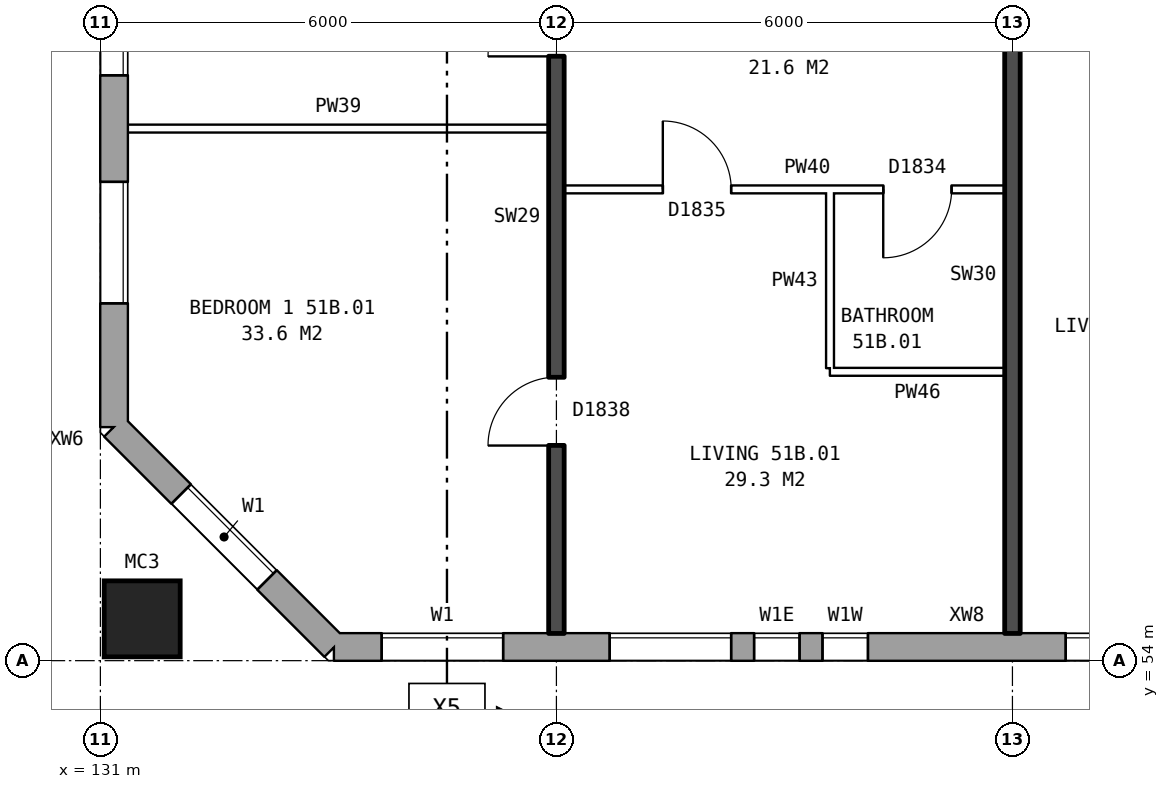
"""IFC4 building model, lengths in metres.
Left out: names, types, materials, properties, quantities, classifications, styles, units other than length and angle.
Written with IfcOpenShell. Run it as: python <this file> out.ifc"""

import sys

from ifc_helpers import new_model, si_unit, direction, frame, frame_2d, origin, origin_2d, place, context, subcontext, project, spatial, rectangle, hollow_rectangle, extrude, element, fill, save


model = new_model("IFC4")
c1 = context("Model", 3, precision=1e-05, world=origin(), true_north=direction((0.0, 1.0)))
c2 = subcontext(c1, "Body", "Model", "MODEL_VIEW")
j1 = project(units=[si_unit("LENGTHUNIT", "METRE"), si_unit("PLANEANGLEUNIT", "RADIAN")], contexts=[c1])
p1 = place(None, origin())
s1 = spatial("IfcSite", under=j1, at=p1, CompositionType="ELEMENT")
p2 = place(p1, origin())
s2 = spatial("IfcBuilding", under=s1, at=p2, CompositionType="ELEMENT")
p3 = place(p2, frame((0.0, 0.0, 182.0)))
s3 = spatial("IfcBuildingStorey", under=s2, at=p3, CompositionType="ELEMENT", Elevation=182.0)
p4 = place(p3, frame((131.55, 54.55, 0.0), z_axis=(0.0, 0.0, 1.0), x_axis=(1.0, 0.0, 0.0)))
e1 = element("IfcColumn", 1, at=p4, inside=s3, PredefinedType="COLUMN", context=c2, shape_type="SweptSolid", body=[
    extrude(hollow_rectangle(XDim=1.0, YDim=1.0, WallThickness=0.055, at=origin_2d()), origin(), (0.0, 0.0, 1.0), 3.1),
])
p5 = place(p3, frame((131.18, 57.075, 0.0), z_axis=(0.0, 0.0, 1.0), x_axis=(0.707106781187, -0.707106781187, 0.0)))
e2 = element("IfcWall", 2, at=p5, inside=s3, PredefinedType="STANDARD", context=c2, shape_type="SweptSolid", body=[
    extrude(rectangle(XDim=4.094, YDim=0.36, at=frame_2d((2.047, 0.0))), origin(), (0.0, 0.0, 1.0), 2.85),
])
p6 = place(p5, frame((1.247, 0.0, 0.8)))
e3 = element("IfcOpeningElement", 3, at=p6, cuts=e2, PredefinedType="OPENING", context=c2, shape_type="SweptSolid", body=[
    extrude(rectangle(XDim=1.6, YDim=1.8, at=frame_2d((0.8, 0.9))), frame((0.0, 0.19, 0.0), z_axis=(0.0, -1.0, 0.0), x_axis=(1.0, 0.0, 0.0)), (0.0, 0.0, 1.0), 0.38),
])
p7 = place(p3, frame((134.075, 54.18, 0.0), z_axis=(0.0, 0.0, 1.0), x_axis=(1.0, 0.0, 0.0)))
e4 = element("IfcWall", 4, at=p7, inside=s3, PredefinedType="STANDARD", context=c2, shape_type="SweptSolid", body=[
    extrude(rectangle(XDim=33.101, YDim=0.36, at=frame_2d((16.55, 0.0))), origin(), (0.0, 0.0, 1.0), 2.85),
])
p8 = place(p7, frame((0.625, 0.0, 0.8)))
e5 = element("IfcOpeningElement", 5, at=p8, cuts=e4, PredefinedType="OPENING", context=c2, shape_type="SweptSolid", body=[
    extrude(rectangle(XDim=1.6, YDim=1.8, at=frame_2d((0.8, 0.9))), frame((0.0, 0.19, 0.0), z_axis=(0.0, -1.0, 0.0), x_axis=(1.0, 0.0, 0.0)), (0.0, 0.0, 1.0), 0.38),
])
p9 = place(p7, frame((3.625, 0.0, 0.8)))
e6 = element("IfcOpeningElement", 6, at=p9, cuts=e4, PredefinedType="OPENING", context=c2, shape_type="SweptSolid", body=[
    extrude(rectangle(XDim=1.6, YDim=1.8, at=frame_2d((0.8, 0.9))), frame((0.0, 0.19, 0.0), z_axis=(0.0, -1.0, 0.0), x_axis=(1.0, 0.0, 0.0)), (0.0, 0.0, 1.0), 0.38),
])
p10 = place(p7, frame((5.525, 0.0, 0.8)))
e7 = element("IfcOpeningElement", 7, at=p10, cuts=e4, PredefinedType="OPENING", context=c2, shape_type="SweptSolid", body=[
    extrude(rectangle(XDim=0.6, YDim=1.8, at=frame_2d((0.3, 0.9))), frame((0.0, 0.19, 0.0), z_axis=(0.0, -1.0, 0.0), x_axis=(1.0, 0.0, 0.0)), (0.0, 0.0, 1.0), 0.38),
])
p11 = place(p7, frame((9.625, 0.0, 0.8)))
e8 = element("IfcOpeningElement", 8, at=p11, cuts=e4, PredefinedType="OPENING", context=c2, shape_type="SweptSolid", body=[
    extrude(rectangle(XDim=1.6, YDim=1.8, at=frame_2d((0.8, 0.9))), frame((0.0, 0.19, 0.0), z_axis=(0.0, -1.0, 0.0), x_axis=(1.0, 0.0, 0.0)), (0.0, 0.0, 1.0), 0.38),
])
p12 = place(p7, frame((12.625, 0.0, 0.8)))
e9 = element("IfcOpeningElement", 9, at=p12, cuts=e4, PredefinedType="OPENING", context=c2, shape_type="SweptSolid", body=[
    extrude(rectangle(XDim=1.6, YDim=1.8, at=frame_2d((0.8, 0.9))), frame((0.0, 0.19, 0.0), z_axis=(0.0, -1.0, 0.0), x_axis=(1.0, 0.0, 0.0)), (0.0, 0.0, 1.0), 0.38),
])
p13 = place(p7, frame((15.625, 0.0, 0.8)))
e10 = element("IfcOpeningElement", 10, at=p13, cuts=e4, PredefinedType="OPENING", context=c2, shape_type="SweptSolid", body=[
    extrude(rectangle(XDim=1.6, YDim=1.8, at=frame_2d((0.8, 0.9))), frame((0.0, 0.19, 0.0), z_axis=(0.0, -1.0, 0.0), x_axis=(1.0, 0.0, 0.0)), (0.0, 0.0, 1.0), 0.38),
])
p14 = place(p7, frame((18.625, 0.0, 0.8)))
e11 = element("IfcOpeningElement", 11, at=p14, cuts=e4, PredefinedType="OPENING", context=c2, shape_type="SweptSolid", body=[
    extrude(rectangle(XDim=1.6, YDim=1.8, at=frame_2d((0.8, 0.9))), frame((0.0, 0.19, 0.0), z_axis=(0.0, -1.0, 0.0), x_axis=(1.0, 0.0, 0.0)), (0.0, 0.0, 1.0), 0.38),
])
p15 = place(p7, frame((21.625, 0.0, 0.8)))
e12 = element("IfcOpeningElement", 12, at=p15, cuts=e4, PredefinedType="OPENING", context=c2, shape_type="SweptSolid", body=[
    extrude(rectangle(XDim=1.6, YDim=1.8, at=frame_2d((0.8, 0.9))), frame((0.0, 0.19, 0.0), z_axis=(0.0, -1.0, 0.0), x_axis=(1.0, 0.0, 0.0)), (0.0, 0.0, 1.0), 0.38),
])
p16 = place(p7, frame((23.525, 0.0, 0.8)))
e13 = element("IfcOpeningElement", 13, at=p16, cuts=e4, PredefinedType="OPENING", context=c2, shape_type="SweptSolid", body=[
    extrude(rectangle(XDim=1.4, YDim=0.9, at=frame_2d((0.7, 0.45))), frame((0.0, 0.19, 0.0), z_axis=(0.0, -1.0, 0.0), x_axis=(1.0, 0.0, 0.0)), (0.0, 0.0, 1.0), 0.38),
])
p17 = place(p7, frame((27.625, 0.0, 0.8)))
e14 = element("IfcOpeningElement", 14, at=p17, cuts=e4, PredefinedType="OPENING", context=c2, shape_type="SweptSolid", body=[
    extrude(rectangle(XDim=1.6, YDim=1.8, at=frame_2d((0.8, 0.9))), frame((0.0, 0.19, 0.0), z_axis=(0.0, -1.0, 0.0), x_axis=(1.0, 0.0, 0.0)), (0.0, 0.0, 1.0), 0.38),
])
p18 = place(p7, frame((30.625, 0.0, 0.8)))
e15 = element("IfcOpeningElement", 15, at=p18, cuts=e4, PredefinedType="OPENING", context=c2, shape_type="SweptSolid", body=[
    extrude(rectangle(XDim=1.6, YDim=1.8, at=frame_2d((0.8, 0.9))), frame((0.0, 0.19, 0.0), z_axis=(0.0, -1.0, 0.0), x_axis=(1.0, 0.0, 0.0)), (0.0, 0.0, 1.0), 0.38),
])
p19 = place(p7, frame((6.425, 0.0, 1.6)))
e16 = element("IfcOpeningElement", 16, at=p19, cuts=e4, PredefinedType="OPENING", context=c2, shape_type="SweptSolid", body=[
    extrude(rectangle(XDim=0.6, YDim=0.9, at=frame_2d((0.3, 0.45))), frame((0.0, 0.19, 0.0), z_axis=(0.0, -1.0, 0.0), x_axis=(1.0, 0.0, 0.0)), (0.0, 0.0, 1.0), 0.38),
])
p20 = place(p7, frame((25.975, 0.0, 1.7)))
e17 = element("IfcOpeningElement", 17, at=p20, cuts=e4, PredefinedType="OPENING", context=c2, shape_type="SweptSolid", body=[
    extrude(rectangle(XDim=0.6, YDim=0.9, at=frame_2d((0.3, 0.45))), frame((0.0, 0.19, 0.0), z_axis=(0.0, -1.0, 0.0), x_axis=(1.0, 0.0, 0.0)), (0.0, 0.0, 1.0), 0.38),
])
p21 = place(p3, frame((131.18, 82.925, 0.0), z_axis=(0.0, 0.0, 1.0), x_axis=(0.0, -1.0, 0.0)))
e18 = element("IfcWall", 18, at=p21, inside=s3, PredefinedType="STANDARD", context=c2, shape_type="SweptSolid", body=[
    extrude(rectangle(XDim=25.851, YDim=0.36, at=frame_2d((12.925, 0.0))), origin(), (0.0, 0.0, 1.0), 2.85),
])
p22 = place(p21, frame((1.625, 0.0, 0.8)))
e19 = element("IfcOpeningElement", 19, at=p22, cuts=e18, PredefinedType="OPENING", context=c2, shape_type="SweptSolid", body=[
    extrude(rectangle(XDim=1.6, YDim=1.8, at=frame_2d((0.8, 0.9))), frame((0.0, 0.19, 0.0), z_axis=(0.0, -1.0, 0.0), x_axis=(1.0, 0.0, 0.0)), (0.0, 0.0, 1.0), 0.38),
])
p23 = place(p21, frame((4.625, 0.0, 0.8)))
e20 = element("IfcOpeningElement", 20, at=p23, cuts=e18, PredefinedType="OPENING", context=c2, shape_type="SweptSolid", body=[
    extrude(rectangle(XDim=1.6, YDim=1.8, at=frame_2d((0.8, 0.9))), frame((0.0, 0.19, 0.0), z_axis=(0.0, -1.0, 0.0), x_axis=(1.0, 0.0, 0.0)), (0.0, 0.0, 1.0), 0.38),
])
p24 = place(p21, frame((19.625, 0.0, 0.8)))
e21 = element("IfcOpeningElement", 21, at=p24, cuts=e18, PredefinedType="OPENING", context=c2, shape_type="SweptSolid", body=[
    extrude(rectangle(XDim=1.6, YDim=1.8, at=frame_2d((0.8, 0.9))), frame((0.0, 0.19, 0.0), z_axis=(0.0, -1.0, 0.0), x_axis=(1.0, 0.0, 0.0)), (0.0, 0.0, 1.0), 0.38),
])
p25 = place(p21, frame((22.625, 0.0, 0.8)))
e22 = element("IfcOpeningElement", 22, at=p25, cuts=e18, PredefinedType="OPENING", context=c2, shape_type="SweptSolid", body=[
    extrude(rectangle(XDim=1.6, YDim=1.8, at=frame_2d((0.8, 0.9))), frame((0.0, 0.19, 0.0), z_axis=(0.0, -1.0, 0.0), x_axis=(1.0, 0.0, 0.0)), (0.0, 0.0, 1.0), 0.38),
])
p26 = place(p3, frame((140.6, 57.8, 0.0), z_axis=(0.0, 0.0, 1.0), x_axis=(1.0, 0.0, 0.0)))
e23 = element("IfcWall", 23, at=p26, inside=s3, PredefinedType="PARTITIONING", context=c2, shape_type="SweptSolid", body=[
    extrude(rectangle(XDim=2.3, YDim=0.1, at=frame_2d((1.15, 0.0))), origin(), (0.0, 0.0, 1.0), 2.85),
])
p27 = place(p3, frame((137.1, 60.2, 0.0), z_axis=(0.0, 0.0, 1.0), x_axis=(1.0, 0.0, 0.0)))
e24 = element("IfcWall", 24, at=p27, inside=s3, PredefinedType="PARTITIONING", context=c2, shape_type="SweptSolid", body=[
    extrude(rectangle(XDim=5.8, YDim=0.1, at=frame_2d((2.9, 0.0))), origin(), (0.0, 0.0, 1.0), 2.85),
])
p28 = place(p27, frame((1.3, 0.0, 0.0)))
e25 = element("IfcOpeningElement", 25, at=p28, cuts=e24, PredefinedType="OPENING", context=c2, shape_type="SweptSolid", body=[
    extrude(rectangle(XDim=0.9, YDim=2.1, at=frame_2d((0.45, 1.05))), frame((0.0, 0.06, 0.0), z_axis=(0.0, -1.0, 0.0), x_axis=(1.0, 0.0, 0.0)), (0.0, 0.0, 1.0), 0.12),
])
p29 = place(p27, frame((4.2, 0.0, 0.0)))
e26 = element("IfcOpeningElement", 26, at=p29, cuts=e24, PredefinedType="OPENING", context=c2, shape_type="SweptSolid", body=[
    extrude(rectangle(XDim=0.9, YDim=2.1, at=frame_2d((0.45, 1.05))), frame((0.0, 0.06, 0.0), z_axis=(0.0, -1.0, 0.0), x_axis=(1.0, 0.0, 0.0)), (0.0, 0.0, 1.0), 0.12),
])
p30 = place(p3, frame((131.36, 61.0, 0.0), z_axis=(0.0, 0.0, 1.0), x_axis=(1.0, 0.0, 0.0)))
e27 = element("IfcWall", 27, at=p30, inside=s3, PredefinedType="PARTITIONING", context=c2, shape_type="SweptSolid", body=[
    extrude(rectangle(XDim=5.54, YDim=0.1, at=frame_2d((2.77, 0.0))), origin(), (0.0, 0.0, 1.0), 2.85),
])
p31 = place(p3, frame((137.0, 54.36, 0.0), z_axis=(0.0, 0.0, 1.0), x_axis=(0.0, 1.0, 0.0)))
e28 = element("IfcWall", 28, at=p31, inside=s3, PredefinedType="SOLIDWALL", context=c2, shape_type="SweptSolid", body=[
    extrude(rectangle(XDim=9.44, YDim=0.2, at=frame_2d((4.72, 0.0))), origin(), (0.0, 0.0, 1.0), 2.85),
])
p32 = place(p31, frame((2.47, 0.0, 0.0)))
e29 = element("IfcOpeningElement", 29, at=p32, cuts=e28, PredefinedType="OPENING", context=c2, shape_type="SweptSolid", body=[
    extrude(rectangle(XDim=0.9, YDim=2.1, at=frame_2d((0.45, 1.05))), frame((0.0, 0.11, 0.0), z_axis=(0.0, -1.0, 0.0), x_axis=(1.0, 0.0, 0.0)), (0.0, 0.0, 1.0), 0.22),
])
p33 = place(p31, frame((7.59, 0.0, 0.0)))
e30 = element("IfcOpeningElement", 30, at=p33, cuts=e28, PredefinedType="OPENING", context=c2, shape_type="SweptSolid", body=[
    extrude(rectangle(XDim=0.9, YDim=2.1, at=frame_2d((0.45, 1.05))), frame((0.0, 0.11, 0.0), z_axis=(0.0, -1.0, 0.0), x_axis=(1.0, 0.0, 0.0)), (0.0, 0.0, 1.0), 0.22),
])
p34 = place(p3, frame((140.6, 57.85, 0.0), z_axis=(0.0, 0.0, 1.0), x_axis=(0.0, 1.0, 0.0)))
e31 = element("IfcWall", 31, at=p34, inside=s3, PredefinedType="PARTITIONING", context=c2, shape_type="SweptSolid", body=[
    extrude(rectangle(XDim=2.3, YDim=0.1, at=frame_2d((1.15, 0.0))), origin(), (0.0, 0.0, 1.0), 2.85),
])
p35 = place(p3, frame((143.0, 54.36, 0.0), z_axis=(0.0, 0.0, 1.0), x_axis=(0.0, 1.0, 0.0)))
e32 = element("IfcWall", 32, at=p35, inside=s3, PredefinedType="SOLIDWALL", context=c2, shape_type="SweptSolid", body=[
    extrude(rectangle(XDim=9.44, YDim=0.2, at=frame_2d((4.72, 0.0))), origin(), (0.0, 0.0, 1.0), 2.85),
])
p36 = place(p6, origin())
e33 = element("IfcWindow", 33, at=p36, inside=s3, PartitioningType="SINGLE_PANEL", PredefinedType="WINDOW", context=c2, shape_type="SweptSolid", body=[
    extrude(rectangle(XDim=1.6, YDim=1.8, at=frame_2d((0.8, 0.9))), frame((0.0, 0.15, 0.0), z_axis=(0.0, -1.0, 0.0), x_axis=(1.0, 0.0, 0.0)), (0.0, 0.0, 1.0), 0.06),
])
fill(e3, e33)
p37 = place(p8, origin())
e34 = element("IfcWindow", 34, at=p37, inside=s3, PartitioningType="SINGLE_PANEL", PredefinedType="WINDOW", context=c2, shape_type="SweptSolid", body=[
    extrude(rectangle(XDim=1.6, YDim=1.8, at=frame_2d((0.8, 0.9))), frame((0.0, 0.15, 0.0), z_axis=(0.0, -1.0, 0.0), x_axis=(1.0, 0.0, 0.0)), (0.0, 0.0, 1.0), 0.06),
])
fill(e5, e34)
p38 = place(p9, origin())
e35 = element("IfcWindow", 35, at=p38, inside=s3, PartitioningType="SINGLE_PANEL", PredefinedType="WINDOW", context=c2, shape_type="SweptSolid", body=[
    extrude(rectangle(XDim=1.6, YDim=1.8, at=frame_2d((0.8, 0.9))), frame((0.0, 0.15, 0.0), z_axis=(0.0, -1.0, 0.0), x_axis=(1.0, 0.0, 0.0)), (0.0, 0.0, 1.0), 0.06),
])
fill(e6, e35)
p39 = place(p10, origin())
e36 = element("IfcWindow", 36, at=p39, inside=s3, PartitioningType="SINGLE_PANEL", PredefinedType="WINDOW", context=c2, shape_type="SweptSolid", body=[
    extrude(rectangle(XDim=0.6, YDim=1.8, at=frame_2d((0.3, 0.9))), frame((0.0, 0.15, 0.0), z_axis=(0.0, -1.0, 0.0), x_axis=(1.0, 0.0, 0.0)), (0.0, 0.0, 1.0), 0.06),
])
fill(e7, e36)
p40 = place(p11, origin())
e37 = element("IfcWindow", 37, at=p40, inside=s3, PartitioningType="SINGLE_PANEL", PredefinedType="WINDOW", context=c2, shape_type="SweptSolid", body=[
    extrude(rectangle(XDim=1.6, YDim=1.8, at=frame_2d((0.8, 0.9))), frame((0.0, 0.15, 0.0), z_axis=(0.0, -1.0, 0.0), x_axis=(1.0, 0.0, 0.0)), (0.0, 0.0, 1.0), 0.06),
])
fill(e8, e37)
p41 = place(p24, origin())
e38 = element("IfcWindow", 38, at=p41, inside=s3, PartitioningType="SINGLE_PANEL", PredefinedType="WINDOW", context=c2, shape_type="SweptSolid", body=[
    extrude(rectangle(XDim=1.6, YDim=1.8, at=frame_2d((0.8, 0.9))), frame((0.0, 0.15, 0.0), z_axis=(0.0, -1.0, 0.0), x_axis=(1.0, 0.0, 0.0)), (0.0, 0.0, 1.0), 0.06),
])
fill(e21, e38)
p42 = place(p25, origin())
e39 = element("IfcWindow", 39, at=p42, inside=s3, PartitioningType="SINGLE_PANEL", PredefinedType="WINDOW", context=c2, shape_type="SweptSolid", body=[
    extrude(rectangle(XDim=1.6, YDim=1.8, at=frame_2d((0.8, 0.9))), frame((0.0, 0.15, 0.0), z_axis=(0.0, -1.0, 0.0), x_axis=(1.0, 0.0, 0.0)), (0.0, 0.0, 1.0), 0.06),
])
fill(e22, e39)
p43 = place(p32, origin())
e40 = element("IfcDoor", 40, at=p43, inside=s3, OperationType="SINGLE_SWING_LEFT", PredefinedType="DOOR", context=c2, shape_type="SweptSolid", body=[
    extrude(rectangle(XDim=0.9, YDim=2.1, at=frame_2d((0.45, 1.05))), frame((0.0, 0.025, 0.0), z_axis=(0.0, -1.0, 0.0), x_axis=(1.0, 0.0, 0.0)), (0.0, 0.0, 1.0), 0.05),
])
fill(e29, e40)
p44 = place(p33, origin())
e41 = element("IfcDoor", 41, at=p44, inside=s3, OperationType="SINGLE_SWING_LEFT", PredefinedType="DOOR", context=c2, shape_type="SweptSolid", body=[
    extrude(rectangle(XDim=0.9, YDim=2.1, at=frame_2d((0.45, 1.05))), frame((0.0, 0.025, 0.0), z_axis=(0.0, -1.0, 0.0), x_axis=(1.0, 0.0, 0.0)), (0.0, 0.0, 1.0), 0.05),
])
fill(e30, e41)
p45 = place(p28, origin())
e42 = element("IfcDoor", 42, at=p45, inside=s3, OperationType="SINGLE_SWING_LEFT", PredefinedType="DOOR", context=c2, shape_type="SweptSolid", body=[
    extrude(rectangle(XDim=0.9, YDim=2.1, at=frame_2d((0.45, 1.05))), frame((0.0, 0.025, 0.0), z_axis=(0.0, -1.0, 0.0), x_axis=(1.0, 0.0, 0.0)), (0.0, 0.0, 1.0), 0.05),
])
fill(e25, e42)
p46 = place(p29, frame((0.9, 0.0, 0.0), z_axis=(0.0, 0.0, 1.0), x_axis=(-1.0, 0.0, 0.0)))
e43 = element("IfcDoor", 43, at=p46, inside=s3, OperationType="SINGLE_SWING_RIGHT", PredefinedType="DOOR", context=c2, shape_type="SweptSolid", body=[
    extrude(rectangle(XDim=0.9, YDim=2.1, at=frame_2d((0.45, 1.05))), frame((0.0, 0.025, 0.0), z_axis=(0.0, -1.0, 0.0), x_axis=(1.0, 0.0, 0.0)), (0.0, 0.0, 1.0), 0.05),
])
fill(e26, e43)
p47 = place(p19, origin())
e44 = element("IfcWindow", 44, at=p47, inside=s3, PartitioningType="SINGLE_PANEL", PredefinedType="WINDOW", context=c2, shape_type="SweptSolid", body=[
    extrude(rectangle(XDim=0.6, YDim=0.9, at=frame_2d((0.3, 0.45))), frame((0.0, 0.15, 0.0), z_axis=(0.0, -1.0, 0.0), x_axis=(1.0, 0.0, 0.0)), (0.0, 0.0, 1.0), 0.06),
])
fill(e16, e44)
save(model, sys.argv[1])
